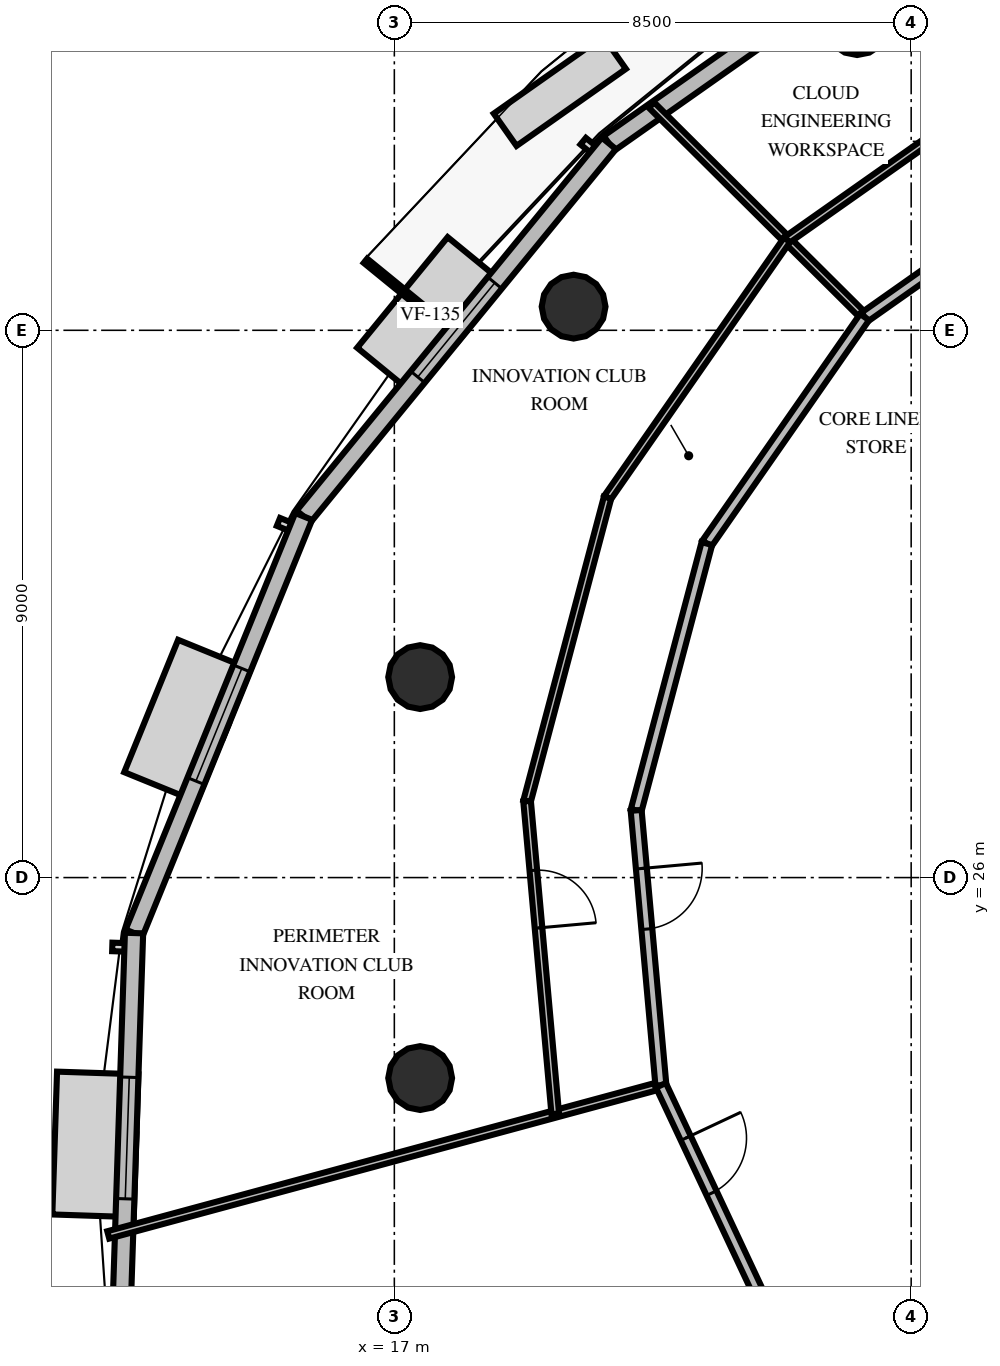
"""IFC4 building model, lengths in metres.
Left out: names, types, materials, properties, quantities, classifications, styles, units other than length and angle.
Written with IfcOpenShell. Run it as: python <this file> out.ifc"""

import sys

from ifc_helpers import new_model, si_unit, direction, frame, frame_2d, origin, origin_2d, place, context, subcontext, project, spatial, rectangle, circle, extrude, element, fill, save


model = new_model("IFC4")
c1 = context("Model", 3, precision=1e-05, world=origin(), true_north=direction((0.0, 1.0)))
c2 = subcontext(c1, "Body", "Model", "MODEL_VIEW")
j1 = project(units=[si_unit("LENGTHUNIT", "METRE"), si_unit("PLANEANGLEUNIT", "RADIAN")], contexts=[c1])
p1 = place(None, origin())
s1 = spatial("IfcSite", under=j1, at=p1, CompositionType="ELEMENT")
p2 = place(p1, origin())
s2 = spatial("IfcBuilding", under=s1, at=p2, CompositionType="ELEMENT")
p3 = place(p2, frame((0.0, 0.0, 180.8)))
s3 = spatial("IfcBuildingStorey", under=s2, at=p3, CompositionType="ELEMENT", Elevation=180.8)
for number, where, z_axis, x_axis in (
    (1, (24.611, 40.052, 0.0), (0.0, 0.0, 1.0), (1.0, 0.0, 0.0)),
    (2, (19.948, 35.389, 0.0), (0.0, 0.0, 1.0), (1.0, 0.0, 0.0)),
    (3, (17.425, 29.297, 0.0), (0.0, 0.0, 1.0), (1.0, 0.0, 0.0)),
    (4, (17.425, 22.703, 0.0), (0.0, 0.0, 1.0), (1.0, 0.0, 0.0)),
):
    element("IfcColumn", number, at=place(p3, frame(where, z_axis=z_axis, x_axis=x_axis)), inside=s3, PredefinedType="COLUMN", context=c2, shape_type="SweptSolid", body=[
        extrude(circle(Radius=0.525, at=origin_2d()), origin(), (0.0, 0.0, 1.0), 3.6),
    ])
p4 = place(p3, frame((27.174, 42.753, 0.0), z_axis=(0.0, 0.0, 1.0), x_axis=(-0.817646670358, -0.575720350911, 0.0)))
e5 = element("IfcWall", 5, at=p4, inside=s3, PredefinedType="SOLIDWALL", context=c2, shape_type="SweptSolid", body=[
    extrude(rectangle(XDim=8.127, YDim=0.3, at=frame_2d((4.063, 0.0))), origin(), (0.0, 0.0, 1.0), 2.66),
])
p5 = place(p4, frame((0.35, 0.0, 0.0)))
e6 = element("IfcOpeningElement", 6, at=p5, cuts=e5, PredefinedType="OPENING", context=c2, shape_type="SweptSolid", body=[
    extrude(rectangle(XDim=1.05, YDim=2.15, at=frame_2d((0.525, 1.075))), frame((0.0, 0.16, 0.0), z_axis=(0.0, -1.0, 0.0), x_axis=(1.0, 0.0, 0.0)), (0.0, 0.0, 1.0), 0.32),
])
p6 = place(p3, frame((20.529, 38.074, 0.0), z_axis=(0.0, 0.0, 1.0), x_axis=(-0.633273009349, -0.773928482245, 0.0)))
e7 = element("IfcWall", 7, at=p6, inside=s3, PredefinedType="SOLIDWALL", context=c2, shape_type="SweptSolid", body=[
    extrude(rectangle(XDim=7.927, YDim=0.3, at=frame_2d((3.963, 0.0))), origin(), (0.0, 0.0, 1.0), 2.66),
])
p7 = place(p6, frame((2.964, 0.0, 0.8)))
e8 = element("IfcOpeningElement", 8, at=p7, cuts=e7, PredefinedType="OPENING", context=c2, shape_type="SweptSolid", body=[
    extrude(rectangle(XDim=2.0, YDim=1.85, at=frame_2d((1.0, 0.925))), frame((0.0, 0.16, 0.0), z_axis=(0.0, -1.0, 0.0), x_axis=(1.0, 0.0, 0.0)), (0.0, 0.0, 1.0), 0.32),
])
p8 = place(p3, frame((15.509, 31.939, 0.0), z_axis=(0.0, 0.0, 1.0), x_axis=(-0.377124954744, -0.926162387764, 0.0)))
e9 = element("IfcWall", 9, at=p8, inside=s3, PredefinedType="SOLIDWALL", context=c2, shape_type="SweptSolid", body=[
    extrude(rectangle(XDim=7.397, YDim=0.3, at=frame_2d((3.699, 0.0))), origin(), (0.0, 0.0, 1.0), 2.66),
])
p9 = place(p8, frame((2.699, 0.0, 0.8)))
e10 = element("IfcOpeningElement", 10, at=p9, cuts=e9, PredefinedType="OPENING", context=c2, shape_type="SweptSolid", body=[
    extrude(rectangle(XDim=2.0, YDim=1.85, at=frame_2d((1.0, 0.925))), frame((0.0, 0.16, 0.0), z_axis=(0.0, -1.0, 0.0), x_axis=(1.0, 0.0, 0.0)), (0.0, 0.0, 1.0), 0.32),
])
p10 = place(p3, frame((12.719, 25.088, 0.0), z_axis=(0.0, 0.0, 1.0), x_axis=(-0.033009922207, -0.999455024019, 0.0)))
e11 = element("IfcWall", 11, at=p10, inside=s3, PredefinedType="SOLIDWALL", context=c2, shape_type="SweptSolid", body=[
    extrude(rectangle(XDim=6.745, YDim=0.3, at=frame_2d((3.373, 0.0))), origin(), (0.0, 0.0, 1.0), 2.66),
])
p11 = place(p10, frame((2.373, 0.0, 0.8)))
e12 = element("IfcOpeningElement", 12, at=p11, cuts=e11, PredefinedType="OPENING", context=c2, shape_type="SweptSolid", body=[
    extrude(rectangle(XDim=2.0, YDim=1.85, at=frame_2d((1.0, 0.925))), frame((0.0, 0.16, 0.0), z_axis=(0.0, -1.0, 0.0), x_axis=(1.0, 0.0, 0.0)), (0.0, 0.0, 1.0), 0.32),
])
p12 = place(p3, frame((24.734, 35.218, 0.0), z_axis=(0.0, 0.0, 1.0), x_axis=(-0.708981208515, 0.705227371826, 0.0)))
e13 = element("IfcWall", 13, at=p12, inside=s3, PredefinedType="PARTITIONING", context=c2, shape_type="SweptSolid", body=[
    extrude(rectangle(XDim=4.943, YDim=0.125, at=frame_2d((2.471, 0.0))), origin(), (0.0, 0.0, 1.0), 2.46),
])
p13 = place(p3, frame((28.445, 37.831, 0.0), z_axis=(0.0, 0.0, 1.0), x_axis=(-0.817672323989, -0.575683915515, 0.0)))
e14 = element("IfcWall", 14, at=p13, inside=s3, PredefinedType="PARTITIONING", context=c2, shape_type="SweptSolid", body=[
    extrude(rectangle(XDim=4.539, YDim=0.18, at=frame_2d((2.27, 0.0))), origin(), (0.0, 0.0, 1.0), 2.46),
])
p14 = place(p3, frame((27.68, 39.46, 0.0), z_axis=(0.0, 0.0, 1.0), x_axis=(-0.817656414875, -0.575706511352, 0.0)))
e15 = element("IfcWall", 15, at=p14, inside=s3, PredefinedType="PARTITIONING", context=c2, shape_type="SweptSolid", body=[
    extrude(rectangle(XDim=5.164, YDim=0.125, at=frame_2d((2.582, 0.0))), origin(), (0.0, 0.0, 1.0), 2.46),
])
p15 = place(p3, frame((21.384, 22.584, 0.0), z_axis=(0.0, 0.0, 1.0), x_axis=(-0.965243270731, -0.261353072122, 0.0)))
e16 = element("IfcWall", 16, at=p15, inside=s3, PredefinedType="PARTITIONING", context=c2, shape_type="SweptSolid", body=[
    extrude(rectangle(XDim=9.416, YDim=0.125, at=frame_2d((4.708, 0.0))), origin(), (0.0, 0.0, 1.0), 2.46),
])
p16 = place(p3, frame((24.734, 35.218, 0.0), z_axis=(0.0, 0.0, 1.0), x_axis=(-0.571417432894, -0.820659562416, 0.0)))
e17 = element("IfcWall", 17, at=p16, inside=s3, PredefinedType="PARTITIONING", context=c2, shape_type="SweptSolid", body=[
    extrude(rectangle(XDim=4.539, YDim=0.18, at=frame_2d((2.27, 0.0))), origin(), (0.0, 0.0, 1.0), 2.46),
])
p17 = place(p3, frame((22.14, 31.493, 0.0), z_axis=(0.0, 0.0, 1.0), x_axis=(-0.256279852774, -0.966602626244, 0.0)))
e18 = element("IfcWall", 18, at=p17, inside=s3, PredefinedType="PARTITIONING", context=c2, shape_type="SweptSolid", body=[
    extrude(rectangle(XDim=4.539, YDim=0.18, at=frame_2d((2.27, 0.0))), origin(), (0.0, 0.0, 1.0), 2.46),
])
p18 = place(p3, frame((20.977, 27.105, 0.0), z_axis=(0.0, 0.0, 1.0), x_axis=(0.089769483635, -0.995962569481, 0.0)))
e19 = element("IfcWall", 19, at=p18, inside=s3, PredefinedType="PARTITIONING", context=c2, shape_type="SweptSolid", body=[
    extrude(rectangle(XDim=4.539, YDim=0.18, at=frame_2d((2.27, 0.0))), origin(), (0.0, 0.0, 1.0), 2.46),
])
p19 = place(p18, frame((0.96, 0.0, 0.0)))
e20 = element("IfcOpeningElement", 20, at=p19, cuts=e19, PredefinedType="OPENING", context=c2, shape_type="SweptSolid", body=[
    extrude(rectangle(XDim=1.0, YDim=2.15, at=frame_2d((0.5, 1.075))), frame((0.0, 0.1, 0.0), z_axis=(0.0, -1.0, 0.0), x_axis=(1.0, 0.0, 0.0)), (0.0, 0.0, 1.0), 0.2),
])
p20 = place(p3, frame((23.458, 36.487, 0.0), z_axis=(0.0, 0.0, 1.0), x_axis=(-0.571420416911, -0.820657484666, 0.0)))
e21 = element("IfcWall", 21, at=p20, inside=s3, PredefinedType="PARTITIONING", context=c2, shape_type="SweptSolid", body=[
    extrude(rectangle(XDim=5.164, YDim=0.125, at=frame_2d((2.582, 0.0))), origin(), (0.0, 0.0, 1.0), 2.46),
])
p21 = place(p3, frame((20.507, 32.249, 0.0), z_axis=(0.0, 0.0, 1.0), x_axis=(-0.256314822001, -0.966593354013, 0.0)))
e22 = element("IfcWall", 22, at=p21, inside=s3, PredefinedType="PARTITIONING", context=c2, shape_type="SweptSolid", body=[
    extrude(rectangle(XDim=5.165, YDim=0.125, at=frame_2d((2.582, 0.0))), origin(), (0.0, 0.0, 1.0), 2.46),
])
p22 = place(p3, frame((19.183, 27.257, 0.0), z_axis=(0.0, 0.0, 1.0), x_axis=(0.089776979935, -0.995961893786, 0.0)))
e23 = element("IfcWall", 23, at=p22, inside=s3, PredefinedType="PARTITIONING", context=c2, shape_type="SweptSolid", body=[
    extrude(rectangle(XDim=5.164, YDim=0.125, at=frame_2d((2.582, 0.0))), origin(), (0.0, 0.0, 1.0), 2.46),
])
p23 = place(p22, frame((1.144, 0.0, 0.0)))
e24 = element("IfcOpeningElement", 24, at=p23, cuts=e23, PredefinedType="OPENING", context=c2, shape_type="SweptSolid", body=[
    extrude(rectangle(XDim=0.95, YDim=2.15, at=frame_2d((0.475, 1.075))), frame((0.0, 0.073, 0.0), z_axis=(0.0, -1.0, 0.0), x_axis=(1.0, 0.0, 0.0)), (0.0, 0.0, 1.0), 0.145),
])
p24 = place(p3, frame((21.384, 22.584, 0.0), z_axis=(0.0, 0.0, 1.0), x_axis=(0.424960205989, -0.905212032248, 0.0)))
e25 = element("IfcWall", 25, at=p24, inside=s3, PredefinedType="PARTITIONING", context=c2, shape_type="SweptSolid", body=[
    extrude(rectangle(XDim=4.539, YDim=0.18, at=frame_2d((2.27, 0.0))), origin(), (0.0, 0.0, 1.0), 2.46),
])
p25 = place(p24, frame((0.96, 0.0, 0.0)))
e26 = element("IfcOpeningElement", 26, at=p25, cuts=e25, PredefinedType="OPENING", context=c2, shape_type="SweptSolid", body=[
    extrude(rectangle(XDim=1.0, YDim=2.15, at=frame_2d((0.5, 1.075))), frame((0.0, 0.1, 0.0), z_axis=(0.0, -1.0, 0.0), x_axis=(1.0, 0.0, 0.0)), (0.0, 0.0, 1.0), 0.2),
])
p26 = place(p7, origin())
e27 = element("IfcWindow", 27, at=p26, inside=s3, PartitioningType="SINGLE_PANEL", PredefinedType="WINDOW", context=c2, shape_type="SweptSolid", body=[
    extrude(rectangle(XDim=2.0, YDim=1.85, at=frame_2d((1.0, 0.925))), frame((0.0, 0.03, 0.0), z_axis=(0.0, -1.0, 0.0), x_axis=(1.0, 0.0, 0.0)), (0.0, 0.0, 1.0), 0.06),
])
fill(e8, e27)
p27 = place(p9, origin())
e28 = element("IfcWindow", 28, at=p27, inside=s3, PartitioningType="SINGLE_PANEL", PredefinedType="WINDOW", context=c2, shape_type="SweptSolid", body=[
    extrude(rectangle(XDim=2.0, YDim=1.85, at=frame_2d((1.0, 0.925))), frame((0.0, 0.03, 0.0), z_axis=(0.0, -1.0, 0.0), x_axis=(1.0, 0.0, 0.0)), (0.0, 0.0, 1.0), 0.06),
])
fill(e10, e28)
p28 = place(p11, origin())
e29 = element("IfcWindow", 29, at=p28, inside=s3, PartitioningType="SINGLE_PANEL", PredefinedType="WINDOW", context=c2, shape_type="SweptSolid", body=[
    extrude(rectangle(XDim=2.0, YDim=1.85, at=frame_2d((1.0, 0.925))), frame((0.0, 0.03, 0.0), z_axis=(0.0, -1.0, 0.0), x_axis=(1.0, 0.0, 0.0)), (0.0, 0.0, 1.0), 0.06),
])
fill(e12, e29)
p29 = place(p19, origin())
e30 = element("IfcDoor", 30, at=p29, inside=s3, OperationType="SINGLE_SWING_LEFT", PredefinedType="DOOR", context=c2, shape_type="SweptSolid", body=[
    extrude(rectangle(XDim=1.0, YDim=2.15, at=frame_2d((0.5, 1.075))), frame((0.0, 0.025, 0.0), z_axis=(0.0, -1.0, 0.0), x_axis=(1.0, 0.0, 0.0)), (0.0, 0.0, 1.0), 0.05),
])
fill(e20, e30)
p30 = place(p23, origin())
e31 = element("IfcDoor", 31, at=p30, inside=s3, OperationType="SINGLE_SWING_RIGHT", PredefinedType="DOOR", context=c2, shape_type="SweptSolid", body=[
    extrude(rectangle(XDim=0.95, YDim=2.15, at=frame_2d((0.475, 1.075))), frame((0.0, 0.025, 0.0), z_axis=(0.0, -1.0, 0.0), x_axis=(1.0, 0.0, 0.0)), (0.0, 0.0, 1.0), 0.05),
])
fill(e24, e31)
p31 = place(p25, origin())
e32 = element("IfcDoor", 32, at=p31, inside=s3, OperationType="SINGLE_SWING_LEFT", PredefinedType="DOOR", context=c2, shape_type="SweptSolid", body=[
    extrude(rectangle(XDim=1.0, YDim=2.15, at=frame_2d((0.5, 1.075))), frame((0.0, 0.025, 0.0), z_axis=(0.0, -1.0, 0.0), x_axis=(1.0, 0.0, 0.0)), (0.0, 0.0, 1.0), 0.05),
])
fill(e26, e32)
save(model, sys.argv[1])
